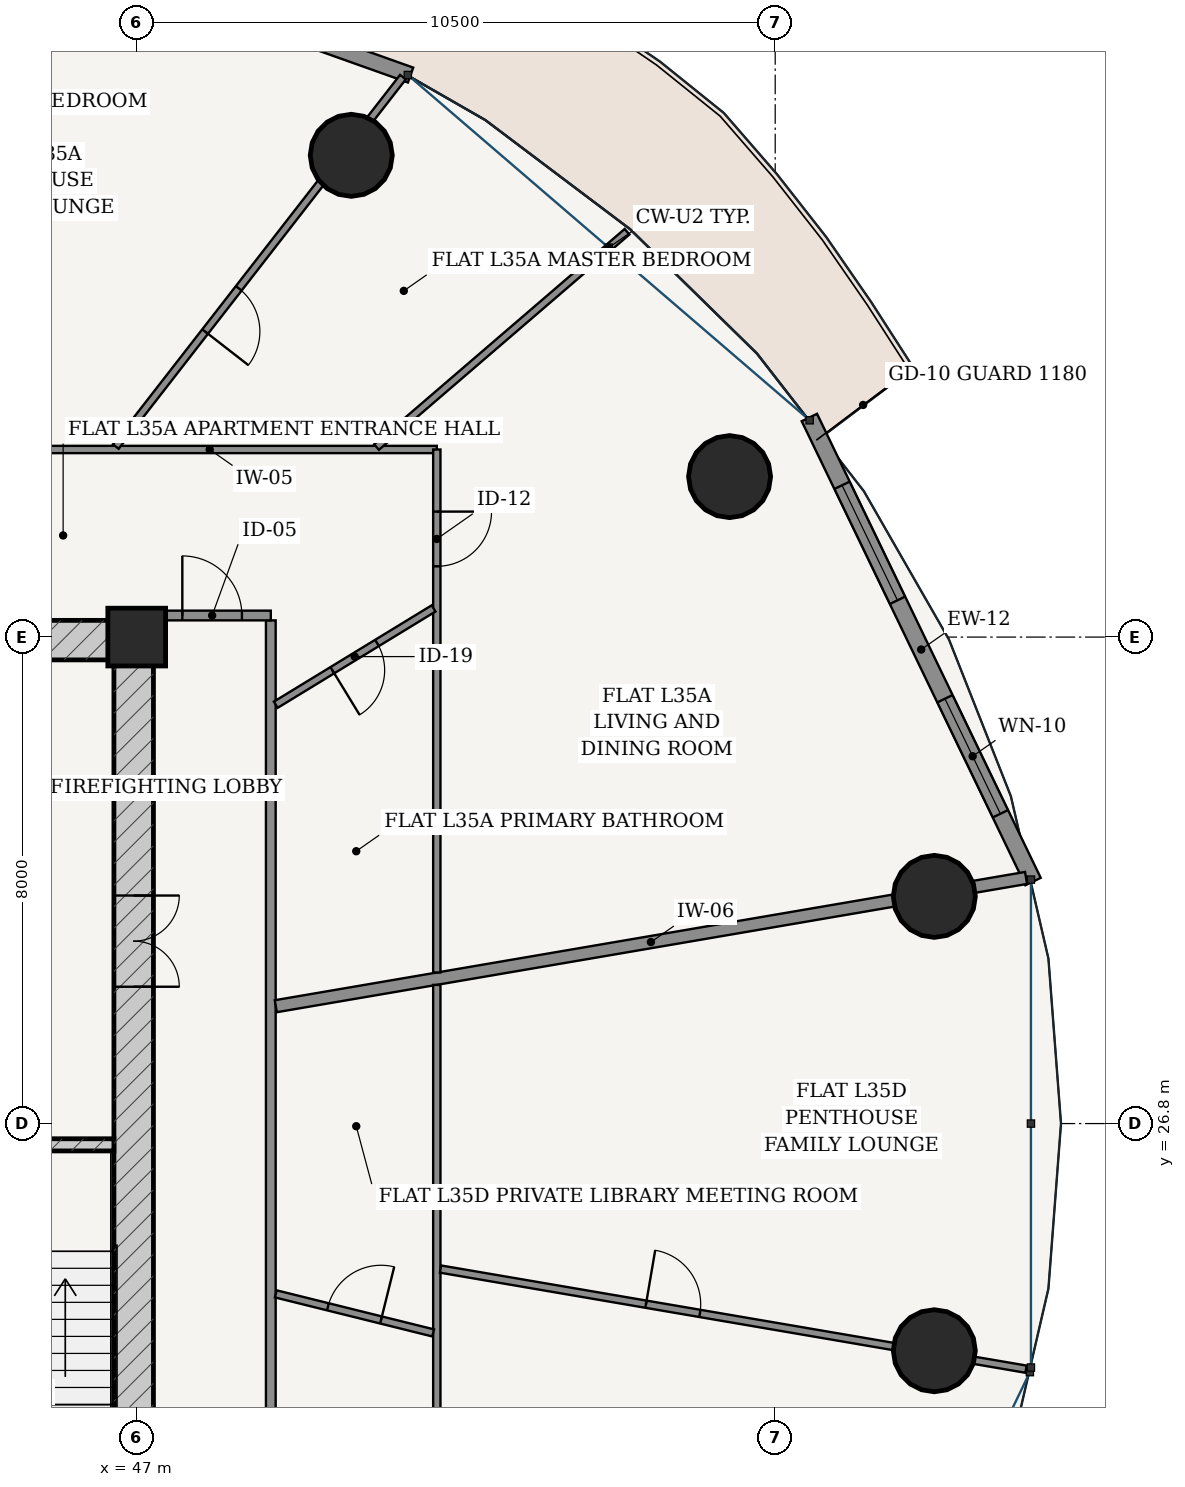
"""IFC4 building model, lengths in metres.
Left out: names, types, materials, properties, quantities, classifications, styles, units other than length and angle.
Written with IfcOpenShell. Run it as: python <this file> out.ifc"""

import sys

from ifc_helpers import new_model, si_unit, direction, frame, frame_2d, origin, origin_2d, place, context, subcontext, project, spatial, rectangle, hollow_circle, extrude, source, transform, mapped, element, fill, save


model = new_model("IFC4")
c1 = context("Model", 3, precision=1e-05, world=origin(), true_north=direction((-0.2419218956, 0.970295726276)))
c2 = subcontext(c1, "Body", "Model", "MODEL_VIEW")
j1 = project(units=[si_unit("LENGTHUNIT", "METRE"), si_unit("PLANEANGLEUNIT", "RADIAN")], contexts=[c1])
p1 = place(None, origin())
s1 = spatial("IfcSite", under=j1, at=p1, CompositionType="ELEMENT")
p2 = place(p1, origin())
s2 = spatial("IfcBuilding", under=s1, at=p2, CompositionType="ELEMENT")
p3 = place(p2, frame((0.0, 0.0, 135.4)))
s3 = spatial("IfcBuildingStorey", under=s2, at=p3, CompositionType="ELEMENT", Elevation=135.4)
p4 = place(p3, frame((47.0, 34.8, 0.0), z_axis=(0.0, 0.0, 1.0), x_axis=(1.0, 0.0, 0.0)))
e1 = element("IfcColumn", 1, at=p4, inside=s3, PredefinedType="COLUMN", context=c2, shape_type="SweptSolid", body=[
    extrude(rectangle(XDim=0.95, YDim=0.95, at=origin_2d()), origin(), (0.0, 0.0, 1.0), 3.6),
])
p5 = place(p3, frame((28.725, 34.75, 0.0), z_axis=(0.0, 0.0, 1.0), x_axis=(1.0, 0.0, 0.0)))
e2 = element("IfcWall", 2, at=p5, inside=s3, PredefinedType="SHEAR", context=c2, shape_type="SweptSolid", body=[
    extrude(rectangle(XDim=18.55, YDim=0.65, at=frame_2d((9.275, 0.0))), origin(), (0.0, 0.0, 1.0), 3.33),
])
p6 = place(p3, frame((46.95, 19.175, 0.0), z_axis=(0.0, 0.0, 1.0), x_axis=(0.0, 1.0, 0.0)))
e3 = element("IfcWall", 3, at=p6, inside=s3, PredefinedType="SHEAR", context=c2, shape_type="SweptSolid", body=[
    extrude(rectangle(XDim=15.25, YDim=0.65, at=frame_2d((7.625, 0.0))), origin(), (0.0, 0.0, 1.0), 3.33),
])
p7 = place(p6, frame((9.875, 0.0, 0.0)))
e4 = element("IfcOpeningElement", 4, at=p7, cuts=e3, PredefinedType="OPENING", context=c2, shape_type="SweptSolid", body=[
    extrude(rectangle(XDim=1.5, YDim=2.2, at=frame_2d((0.75, 1.1))), frame((0.0, 0.335, 0.0), z_axis=(0.0, -1.0, 0.0), x_axis=(1.0, 0.0, 0.0)), (0.0, 0.0, 1.0), 0.67),
])
p8 = place(p3, frame((43.305, 26.45, 0.0), z_axis=(0.0, 0.0, 1.0), x_axis=(1.0, 0.0, 0.0)))
e5 = element("IfcWall", 5, at=p8, inside=s3, PredefinedType="SOLIDWALL", context=c2, shape_type="SweptSolid", body=[
    extrude(rectangle(XDim=3.32, YDim=0.2, at=frame_2d((1.66, 0.0))), origin(), (0.0, 0.0, 1.0), 3.33),
])
p9 = place(p8, frame((1.185, 0.0, 0.0)))
e6 = element("IfcOpeningElement", 6, at=p9, cuts=e5, PredefinedType="OPENING", context=c2, shape_type="SweptSolid", body=[
    extrude(rectangle(XDim=0.95, YDim=2.15, at=frame_2d((0.475, 1.075))), frame((0.0, 0.11, 0.0), z_axis=(0.0, -1.0, 0.0), x_axis=(1.0, 0.0, 0.0)), (0.0, 0.0, 1.0), 0.22),
])
for number, where, z_axis, x_axis in (
    (7, (60.117, 30.536, 0.0), (0.0, 0.0, 1.0), (1.0, 0.0, 0.0)),
    (8, (56.75, 37.439, 0.0), (0.0, 0.0, 1.0), (1.0, 0.0, 0.0)),
    (9, (50.528, 42.723, 0.0), (0.0, 0.0, 1.0), (1.0, 0.0, 0.0)),
    (10, (60.117, 23.064, 0.0), (0.0, 0.0, 1.0), (1.0, 0.0, 0.0)),
):
    element("IfcColumn", number, at=place(p3, frame(where, z_axis=z_axis, x_axis=x_axis)), inside=s3, PredefinedType="COLUMN", context=c2, shape_type="SweptSolid", body=[
        extrude(hollow_circle(Radius=0.675, WallThickness=0.042, at=origin_2d()), origin(), (0.0, 0.0, 1.0), 3.6),
    ])
p10 = place(p3, frame((61.74, 30.78, 0.0), z_axis=(0.0, 0.0, 1.0), x_axis=(-0.434209827226, 0.900811759437, 0.0)))
e11 = element("IfcWall", 11, at=p10, inside=s3, PredefinedType="SOLIDWALL", context=c2, shape_type="SweptSolid", body=[
    extrude(rectangle(XDim=8.472, YDim=0.28, at=frame_2d((4.236, 0.0))), origin(), (0.0, 0.0, 1.0), 3.33),
])
p11 = place(p10, frame((1.237, 0.0, 0.85)))
e12 = element("IfcOpeningElement", 12, at=p11, cuts=e11, PredefinedType="OPENING", context=c2, shape_type="SweptSolid", body=[
    extrude(rectangle(XDim=2.1, YDim=1.95, at=frame_2d((1.05, 0.975))), frame((0.0, 0.15, 0.0), z_axis=(0.0, -1.0, 0.0), x_axis=(1.0, 0.0, 0.0)), (0.0, 0.0, 1.0), 0.3),
])
p12 = place(p10, frame((5.134, 0.0, 0.85)))
e13 = element("IfcOpeningElement", 13, at=p12, cuts=e11, PredefinedType="OPENING", context=c2, shape_type="SweptSolid", body=[
    extrude(rectangle(XDim=2.1, YDim=1.95, at=frame_2d((1.05, 0.975))), frame((0.0, 0.15, 0.0), z_axis=(0.0, -1.0, 0.0), x_axis=(1.0, 0.0, 0.0)), (0.0, 0.0, 1.0), 0.3),
])
p13 = place(p3, frame((51.503, 44.043, 0.0), z_axis=(0.0, 0.0, 1.0), x_axis=(-0.942095406405, 0.335344964522, 0.0)))
e14 = element("IfcWall", 14, at=p13, inside=s3, PredefinedType="SOLIDWALL", context=c2, shape_type="SweptSolid", body=[
    extrude(rectangle(XDim=9.408, YDim=0.26, at=frame_2d((4.704, 0.0))), origin(), (0.0, 0.0, 1.0), 3.33),
])
p14 = place(p13, frame((4.029, 0.0, 0.0)))
e15 = element("IfcOpeningElement", 15, at=p14, cuts=e14, PredefinedType="OPENING", context=c2, shape_type="SweptSolid", body=[
    extrude(rectangle(XDim=1.35, YDim=2.2, at=frame_2d((0.675, 1.1))), frame((0.0, 0.14, 0.0), z_axis=(0.0, -1.0, 0.0), x_axis=(1.0, 0.0, 0.0)), (0.0, 0.0, 1.0), 0.28),
])
p15 = place(p3, frame((49.205, 16.675, 0.0), z_axis=(0.0, 0.0, 1.0), x_axis=(0.0, 1.0, 0.0)))
e16 = element("IfcWall", 16, at=p15, inside=s3, PredefinedType="PARTITIONING", context=c2, shape_type="SweptSolid", body=[
    extrude(rectangle(XDim=18.4, YDim=0.16, at=frame_2d((9.2, 0.0))), origin(), (0.0, 0.0, 1.0), 2.776),
])
p16 = place(p3, frame((47.275, 35.155, 0.0), z_axis=(0.0, 0.0, 1.0), x_axis=(1.0, 0.0, 0.0)))
e17 = element("IfcWall", 17, at=p16, inside=s3, PredefinedType="PARTITIONING", context=c2, shape_type="SweptSolid", body=[
    extrude(rectangle(XDim=1.93, YDim=0.16, at=frame_2d((0.965, 0.0))), origin(), (0.0, 0.0, 1.0), 2.776),
])
p17 = place(p16, frame((0.475, 0.0, 0.0)))
e18 = element("IfcOpeningElement", 18, at=p17, cuts=e17, PredefinedType="OPENING", context=c2, shape_type="SweptSolid", body=[
    extrude(rectangle(XDim=0.98, YDim=2.2, at=frame_2d((0.49, 1.1))), frame((0.0, 0.09, 0.0), z_axis=(0.0, -1.0, 0.0), x_axis=(1.0, 0.0, 0.0)), (0.0, 0.0, 1.0), 0.18),
])
p18 = place(p3, frame((49.287, 28.73, 0.0), z_axis=(0.0, 0.0, 1.0), x_axis=(0.985698993845, 0.168515558725, 0.0)))
e19 = element("IfcWall", 19, at=p18, inside=s3, PredefinedType="PARTITIONING", context=c2, shape_type="SweptSolid", body=[
    extrude(rectangle(XDim=12.517, YDim=0.2, at=frame_2d((6.259, 0.0))), origin(), (0.0, 0.0, 1.0), 2.776),
])
p19 = place(p3, frame((44.465, 37.885, 0.0), z_axis=(0.0, 0.0, 1.0), x_axis=(1.0, 0.0, 0.0)))
e20 = element("IfcWall", 20, at=p19, inside=s3, PredefinedType="PARTITIONING", context=c2, shape_type="SweptSolid", body=[
    extrude(rectangle(XDim=7.47, YDim=0.12, at=frame_2d((3.735, 0.0))), origin(), (0.0, 0.0, 1.0), 2.776),
])
p20 = place(p3, frame((51.935, 37.885, 0.0), z_axis=(0.0, 0.0, 1.0), x_axis=(0.0, -1.0, 0.0)))
e21 = element("IfcWall", 21, at=p20, inside=s3, PredefinedType="PARTITIONING", context=c2, shape_type="SweptSolid", body=[
    extrude(rectangle(XDim=8.601, YDim=0.12, at=frame_2d((4.3, 0.0))), origin(), (0.0, 0.0, 1.0), 2.776),
])
p21 = place(p20, frame((1.021, 0.0, 0.0)))
e22 = element("IfcOpeningElement", 22, at=p21, cuts=e21, PredefinedType="OPENING", context=c2, shape_type="SweptSolid", body=[
    extrude(rectangle(XDim=0.9, YDim=2.15, at=frame_2d((0.45, 1.075))), frame((0.0, 0.07, 0.0), z_axis=(0.0, -1.0, 0.0), x_axis=(1.0, 0.0, 0.0)), (0.0, 0.0, 1.0), 0.14),
])
p22 = place(p3, frame((50.944, 37.925, 0.0), z_axis=(0.0, 0.0, 1.0), x_axis=(0.758354915574, 0.65184186888, 0.0)))
e23 = element("IfcWall", 23, at=p22, inside=s3, PredefinedType="PARTITIONING", context=c2, shape_type="SweptSolid", body=[
    extrude(rectangle(XDim=5.432, YDim=0.12, at=frame_2d((2.716, 0.0))), origin(), (0.0, 0.0, 1.0), 2.846),
])
p23 = place(p3, frame((46.656, 37.934, 0.0), z_axis=(0.0, 0.0, 1.0), x_axis=(0.613758289074, 0.789493991487, 0.0)))
e24 = element("IfcWall", 24, at=p23, inside=s3, PredefinedType="PARTITIONING", context=c2, shape_type="SweptSolid", body=[
    extrude(rectangle(XDim=7.695, YDim=0.12, at=frame_2d((3.848, 0.0))), origin(), (0.0, 0.0, 1.0), 2.776),
])
p24 = place(p23, frame((2.395, 0.0, 0.0)))
e25 = element("IfcOpeningElement", 25, at=p24, cuts=e24, PredefinedType="OPENING", context=c2, shape_type="SweptSolid", body=[
    extrude(rectangle(XDim=0.9, YDim=2.15, at=frame_2d((0.45, 1.075))), frame((0.0, 0.07, 0.0), z_axis=(0.0, -1.0, 0.0), x_axis=(1.0, 0.0, 0.0)), (0.0, 0.0, 1.0), 0.14),
])
p25 = place(p3, frame((49.287, 33.688, 0.0), z_axis=(0.0, 0.0, 1.0), x_axis=(0.853628993111, 0.520881504874, 0.0)))
e26 = element("IfcWall", 26, at=p25, inside=s3, PredefinedType="PARTITIONING", context=c2, shape_type="SweptSolid", body=[
    extrude(rectangle(XDim=3.041, YDim=0.12, at=frame_2d((1.52, 0.0))), origin(), (0.0, 0.0, 1.0), 3.005),
])
p26 = place(p25, frame((1.09, 0.0, 0.0)))
e27 = element("IfcOpeningElement", 27, at=p26, cuts=e26, PredefinedType="OPENING", context=c2, shape_type="SweptSolid", body=[
    extrude(rectangle(XDim=0.86, YDim=2.15, at=frame_2d((0.43, 1.075))), frame((0.0, 0.07, 0.0), z_axis=(0.0, -1.0, 0.0), x_axis=(1.0, 0.0, 0.0)), (0.0, 0.0, 1.0), 0.14),
])
p27 = place(p3, frame((51.935, 29.08, 0.0), z_axis=(0.0, 0.0, 1.0), x_axis=(0.0, -1.0, 0.0)))
e28 = element("IfcWall", 28, at=p27, inside=s3, PredefinedType="PARTITIONING", context=c2, shape_type="SweptSolid", body=[
    extrude(rectangle(XDim=15.215, YDim=0.12, at=frame_2d((7.608, 0.0))), origin(), (0.0, 0.0, 1.0), 2.776),
])
p28 = place(p27, frame((11.859, 0.0, 0.0)))
e29 = element("IfcOpeningElement", 29, at=p28, cuts=e28, PredefinedType="OPENING", context=c2, shape_type="SweptSolid", body=[
    extrude(rectangle(XDim=0.9, YDim=2.15, at=frame_2d((0.45, 1.075))), frame((0.0, 0.07, 0.0), z_axis=(0.0, -1.0, 0.0), x_axis=(1.0, 0.0, 0.0)), (0.0, 0.0, 1.0), 0.14),
])
p29 = place(p27, frame((7.49, 0.0, 0.0)))
e30 = element("IfcOpeningElement", 30, at=p29, cuts=e28, PredefinedType="OPENING", context=c2, shape_type="SweptSolid", body=[
    extrude(rectangle(XDim=0.9, YDim=2.15, at=frame_2d((0.45, 1.075))), frame((0.0, 0.07, 0.0), z_axis=(0.0, -1.0, 0.0), x_axis=(1.0, 0.0, 0.0)), (0.0, 0.0, 1.0), 0.14),
])
p30 = place(p3, frame((51.996, 24.407, 0.0), z_axis=(0.0, 0.0, 1.0), x_axis=(0.985698378271, -0.168519159369, 0.0)))
e31 = element("IfcWall", 31, at=p30, inside=s3, PredefinedType="PARTITIONING", context=c2, shape_type="SweptSolid", body=[
    extrude(rectangle(XDim=9.769, YDim=0.12, at=frame_2d((4.884, 0.0))), origin(), (0.0, 0.0, 1.0), 2.776),
])
p31 = place(p30, frame((3.428, 0.0, 0.0)))
e32 = element("IfcOpeningElement", 32, at=p31, cuts=e31, PredefinedType="OPENING", context=c2, shape_type="SweptSolid", body=[
    extrude(rectangle(XDim=0.9, YDim=2.15, at=frame_2d((0.45, 1.075))), frame((0.0, 0.07, 0.0), z_axis=(0.0, -1.0, 0.0), x_axis=(1.0, 0.0, 0.0)), (0.0, 0.0, 1.0), 0.14),
])
p32 = place(p3, frame((49.287, 23.999, 0.0), z_axis=(0.0, 0.0, 1.0), x_axis=(0.970571855633, -0.240811696256, 0.0)))
e33 = element("IfcWall", 33, at=p32, inside=s3, PredefinedType="PARTITIONING", context=c2, shape_type="SweptSolid", body=[
    extrude(rectangle(XDim=2.666, YDim=0.12, at=frame_2d((1.333, 0.0))), origin(), (0.0, 0.0, 1.0), 3.33),
])
p33 = place(p32, frame((0.883, 0.0, 0.0)))
e34 = element("IfcOpeningElement", 34, at=p33, cuts=e33, PredefinedType="OPENING", context=c2, shape_type="SweptSolid", body=[
    extrude(rectangle(XDim=0.9, YDim=2.15, at=frame_2d((0.45, 1.075))), frame((0.0, 0.07, 0.0), z_axis=(0.0, -1.0, 0.0), x_axis=(1.0, 0.0, 0.0)), (0.0, 0.0, 1.0), 0.14),
])
m1 = source(origin(), c2, "Body", "SweptSolid", [
    extrude(rectangle(XDim=2.1, YDim=1.95, at=frame_2d((1.05, 0.975))), frame((0.0, 0.03, 0.0), z_axis=(0.0, -1.0, 0.0), x_axis=(1.0, 0.0, 0.0)), (0.0, 0.0, 1.0), 0.06),
])
p34 = place(p11, origin())
e35 = element("IfcWindow", 35, at=p34, inside=s3, PartitioningType="SINGLE_PANEL", PredefinedType="WINDOW", context=c2, shape_type="MappedRepresentation", body=[
    mapped(m1, transform((0.0, 0.0, 0.0), scale=1.0)),
])
fill(e12, e35)
p35 = place(p12, origin())
e36 = element("IfcWindow", 36, at=p35, inside=s3, PartitioningType="SINGLE_PANEL", PredefinedType="WINDOW", context=c2, shape_type="MappedRepresentation", body=[
    mapped(m1, transform((0.0, 0.0, 0.0), scale=1.0)),
])
fill(e13, e36)
m2 = source(origin(), c2, "Body", "SweptSolid", [
    extrude(rectangle(XDim=1.5, YDim=2.2, at=frame_2d((0.75, 1.1))), frame((0.0, 0.025, 0.0), z_axis=(0.0, -1.0, 0.0), x_axis=(1.0, 0.0, 0.0)), (0.0, 0.0, 1.0), 0.05),
])
p36 = place(p7, frame((1.5, 0.0, 0.0), z_axis=(0.0, 0.0, 1.0), x_axis=(-1.0, 0.0, 0.0)))
e37 = element("IfcDoor", 37, at=p36, inside=s3, OperationType="DOUBLE_DOOR_SINGLE_SWING", PredefinedType="DOOR", context=c2, shape_type="MappedRepresentation", body=[
    mapped(m2, transform((0.0, 0.0, 0.0), scale=1.0)),
])
fill(e4, e37)
m3 = source(origin(), c2, "Body", "SweptSolid", [
    extrude(rectangle(XDim=0.98, YDim=2.2, at=frame_2d((0.49, 1.1))), frame((0.0, 0.025, 0.0), z_axis=(0.0, -1.0, 0.0), x_axis=(1.0, 0.0, 0.0)), (0.0, 0.0, 1.0), 0.05),
])
p37 = place(p17, origin())
e38 = element("IfcDoor", 38, at=p37, inside=s3, OperationType="SINGLE_SWING_LEFT", PredefinedType="DOOR", context=c2, shape_type="MappedRepresentation", body=[
    mapped(m3, transform((0.0, 0.0, 0.0), scale=1.0)),
])
fill(e18, e38)
m4 = source(origin(), c2, "Body", "SweptSolid", [
    extrude(rectangle(XDim=0.86, YDim=2.15, at=frame_2d((0.43, 1.075))), frame((0.0, 0.025, 0.0), z_axis=(0.0, -1.0, 0.0), x_axis=(1.0, 0.0, 0.0)), (0.0, 0.0, 1.0), 0.05),
])
p38 = place(p26, frame((0.86, 0.0, 0.0), z_axis=(0.0, 0.0, 1.0), x_axis=(-1.0, 0.0, 0.0)))
e39 = element("IfcDoor", 39, at=p38, inside=s3, OperationType="SINGLE_SWING_RIGHT", PredefinedType="DOOR", context=c2, shape_type="MappedRepresentation", body=[
    mapped(m4, transform((0.0, 0.0, 0.0), scale=1.0)),
])
fill(e27, e39)
m5 = source(origin(), c2, "Body", "SweptSolid", [
    extrude(rectangle(XDim=0.9, YDim=2.15, at=frame_2d((0.45, 1.075))), frame((0.0, 0.025, 0.0), z_axis=(0.0, -1.0, 0.0), x_axis=(1.0, 0.0, 0.0)), (0.0, 0.0, 1.0), 0.05),
])
p39 = place(p21, origin())
e40 = element("IfcDoor", 40, at=p39, inside=s3, OperationType="SINGLE_SWING_LEFT", PredefinedType="DOOR", context=c2, shape_type="MappedRepresentation", body=[
    mapped(m5, transform((0.0, 0.0, 0.0), scale=1.0)),
])
fill(e22, e40)
p40 = place(p24, frame((0.9, 0.0, 0.0), z_axis=(0.0, 0.0, 1.0), x_axis=(-1.0, 0.0, 0.0)))
e41 = element("IfcDoor", 41, at=p40, inside=s3, OperationType="SINGLE_SWING_RIGHT", PredefinedType="DOOR", context=c2, shape_type="MappedRepresentation", body=[
    mapped(m5, transform((0.0, 0.0, 0.0), scale=1.0)),
])
fill(e25, e41)
p41 = place(p33, origin())
e42 = element("IfcDoor", 42, at=p41, inside=s3, OperationType="SINGLE_SWING_RIGHT", PredefinedType="DOOR", context=c2, shape_type="MappedRepresentation", body=[
    mapped(m5, transform((0.0, 0.0, 0.0), scale=1.0)),
])
fill(e34, e42)
p42 = place(p31, origin())
e43 = element("IfcDoor", 43, at=p42, inside=s3, OperationType="SINGLE_SWING_LEFT", PredefinedType="DOOR", context=c2, shape_type="MappedRepresentation", body=[
    mapped(m5, transform((0.0, 0.0, 0.0), scale=1.0)),
])
fill(e32, e43)
save(model, sys.argv[1])
